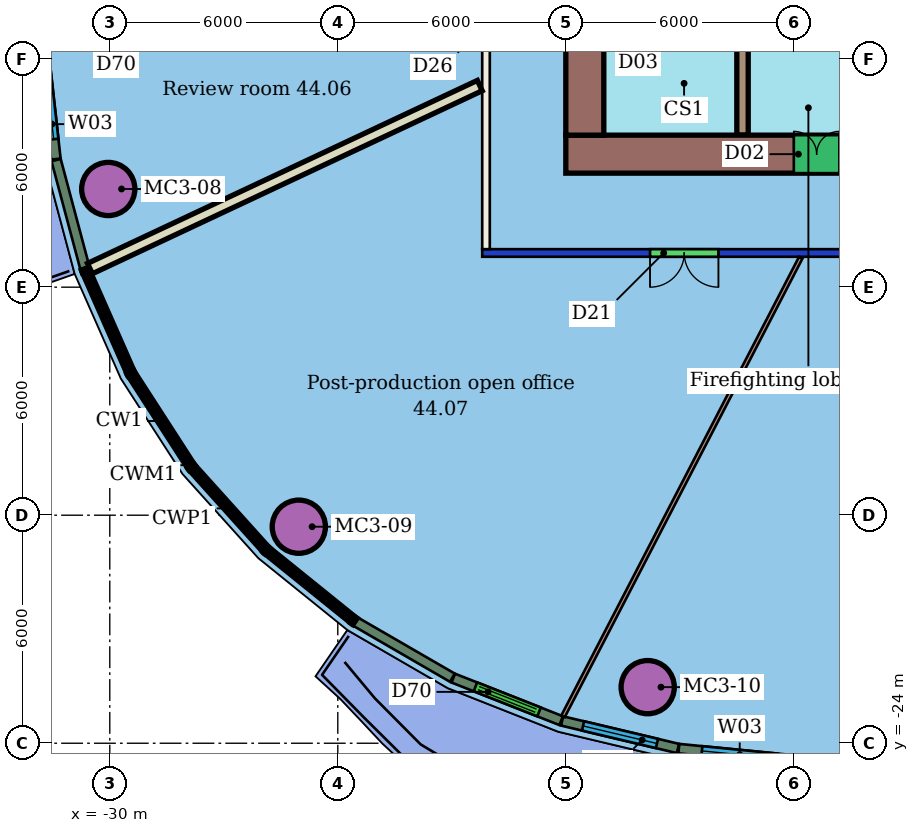
"""IFC4 building model, lengths in metres.
Left out: names, types, materials, properties, quantities, classifications, styles, units other than length and angle.
Written with IfcOpenShell. Run it as: python <this file> out.ifc"""

import sys

from ifc_helpers import new_model, si_unit, direction, frame, frame_2d, origin, origin_2d, place, context, subcontext, project, spatial, rectangle, hollow_circle, extrude, element, fill, save


model = new_model("IFC4")
c1 = context("Model", 3, precision=1e-05, world=origin(), true_north=direction((0.0, 1.0)))
c2 = subcontext(c1, "Body", "Model", "MODEL_VIEW")
j1 = project(units=[si_unit("LENGTHUNIT", "METRE"), si_unit("PLANEANGLEUNIT", "RADIAN")], contexts=[c1])
p1 = place(None, origin())
s1 = spatial("IfcSite", under=j1, at=p1, CompositionType="ELEMENT")
p2 = place(p1, origin())
s2 = spatial("IfcBuilding", under=s1, at=p2, CompositionType="ELEMENT")
p3 = place(p2, frame((0.0, 0.0, 183.0)))
s3 = spatial("IfcBuildingStorey", under=s2, at=p3, CompositionType="ELEMENT", Elevation=183.0)
for number, where, z_axis, x_axis in (
    (1, (-30.041, -9.417, 0.0), (0.0, 0.0, 1.0), (1.0, 0.0, 0.0)),
    (2, (-25.026, -18.303, 0.0), (0.0, 0.0, 1.0), (1.0, 0.0, 0.0)),
    (3, (-15.845, -22.524, 0.0), (0.0, 0.0, 1.0), (1.0, 0.0, 0.0)),
):
    element("IfcColumn", number, at=place(p3, frame(where, z_axis=z_axis, x_axis=x_axis)), inside=s3, PredefinedType="COLUMN", context=c2, shape_type="SweptSolid", body=[
        extrude(hollow_circle(Radius=0.7, WallThickness=0.05, at=origin_2d()), origin(), (0.0, 0.0, 1.0), 3.45),
    ])
p4 = place(p3, frame((8.2, -11.1, 0.0), z_axis=(0.0, 0.0, 1.0), x_axis=(-1.0, 0.0, 0.0)))
e4 = element("IfcWall", 4, at=p4, inside=s3, PredefinedType="PARTITIONING", context=c2, shape_type="SweptSolid", body=[
    extrude(rectangle(XDim=28.4, YDim=0.2, at=frame_2d((14.2, 0.0))), origin(), (0.0, 0.0, 1.0), 3.05),
])
p5 = place(p4, frame((22.184, 0.0, 0.0)))
e5 = element("IfcOpeningElement", 5, at=p5, cuts=e4, PredefinedType="OPENING", context=c2, shape_type="SweptSolid", body=[
    extrude(rectangle(XDim=1.8, YDim=2.1, at=frame_2d((0.9, 1.05))), frame((0.0, 0.11, 0.0), z_axis=(0.0, -1.0, 0.0), x_axis=(1.0, 0.0, 0.0)), (0.0, 0.0, 1.0), 0.22),
])
p6 = place(p4, frame((15.038, 0.0, 0.0)))
e6 = element("IfcOpeningElement", 6, at=p6, cuts=e4, PredefinedType="OPENING", context=c2, shape_type="SweptSolid", body=[
    extrude(rectangle(XDim=1.8, YDim=2.1, at=frame_2d((0.9, 1.05))), frame((0.0, 0.11, 0.0), z_axis=(0.0, -1.0, 0.0), x_axis=(1.0, 0.0, 0.0)), (0.0, 0.0, 1.0), 0.22),
])
p7 = place(p4, frame((4.866, 0.0, 0.0)))
e7 = element("IfcOpeningElement", 7, at=p7, cuts=e4, PredefinedType="OPENING", context=c2, shape_type="SweptSolid", body=[
    extrude(rectangle(XDim=1.0, YDim=2.1, at=frame_2d((0.5, 1.05))), frame((0.0, 0.11, 0.0), z_axis=(0.0, -1.0, 0.0), x_axis=(1.0, 0.0, 0.0)), (0.0, 0.0, 1.0), 0.22),
])
p8 = place(p3, frame((-20.1, -11.0, 0.0), z_axis=(0.0, 0.0, 1.0), x_axis=(0.0, 1.0, 0.0)))
e8 = element("IfcWall", 8, at=p8, inside=s3, PredefinedType="PARTITIONING", context=c2, shape_type="SweptSolid", body=[
    extrude(rectangle(XDim=22.0, YDim=0.2, at=frame_2d((11.0, 0.0))), origin(), (0.0, 0.0, 1.0), 3.45),
])
p9 = place(p8, frame((15.37, 0.0, 0.0)))
e9 = element("IfcOpeningElement", 9, at=p9, cuts=e8, PredefinedType="OPENING", context=c2, shape_type="SweptSolid", body=[
    extrude(rectangle(XDim=1.2, YDim=2.1, at=frame_2d((0.6, 1.05))), frame((0.0, 0.11, 0.0), z_axis=(0.0, -1.0, 0.0), x_axis=(1.0, 0.0, 0.0)), (0.0, 0.0, 1.0), 0.22),
])
p10 = place(p8, frame((9.37, 0.0, 0.0)))
e10 = element("IfcOpeningElement", 10, at=p10, cuts=e8, PredefinedType="OPENING", context=c2, shape_type="SweptSolid", body=[
    extrude(rectangle(XDim=1.2, YDim=2.1, at=frame_2d((0.6, 1.05))), frame((0.0, 0.11, 0.0), z_axis=(0.0, -1.0, 0.0), x_axis=(1.0, 0.0, 0.0)), (0.0, 0.0, 1.0), 0.22),
])
p11 = place(p8, frame((5.797, 0.0, 0.0)))
e11 = element("IfcOpeningElement", 11, at=p11, cuts=e8, PredefinedType="OPENING", context=c2, shape_type="SweptSolid", body=[
    extrude(rectangle(XDim=1.2, YDim=2.1, at=frame_2d((0.6, 1.05))), frame((0.0, 0.11, 0.0), z_axis=(0.0, -1.0, 0.0), x_axis=(1.0, 0.0, 0.0)), (0.0, 0.0, 1.0), 0.22),
])
p12 = place(p3, frame((-30.522, -11.511, 0.0), z_axis=(0.0, 0.0, 1.0), x_axis=(0.905230348608, 0.424921187938, 0.0)))
e12 = element("IfcWall", 12, at=p12, inside=s3, PredefinedType="PARTITIONING", context=c2, shape_type="SweptSolid", body=[
    extrude(rectangle(XDim=11.333, YDim=0.3, at=frame_2d((5.666, 0.0))), origin(), (0.0, 0.0, 1.0), 3.45),
])
p13 = place(p3, frame((-18.073, -23.292, 0.0), z_axis=(0.0, 0.0, 1.0), x_axis=(0.460190817997, 0.88782003302, 0.0)))
e13 = element("IfcWall", 13, at=p13, inside=s3, PredefinedType="PARTITIONING", context=c2, shape_type="SweptSolid", body=[
    extrude(rectangle(XDim=13.594, YDim=0.1, at=frame_2d((6.797, 0.0))), origin(), (0.0, 0.0, 1.0), 3.45),
])
p14 = place(p3, frame((-31.758, -5.597, 0.0), z_axis=(0.0, 0.0, 1.0), x_axis=(0.111450096945, -0.993770031693, 0.0)))
e14 = element("IfcWall", 14, at=p14, inside=s3, PredefinedType="SOLIDWALL", context=c2, shape_type="SweptSolid", body=[
    extrude(rectangle(XDim=3.052, YDim=0.25, at=frame_2d((1.526, 0.0))), origin(), (0.0, 0.0, 1.0), 3.1),
])
p15 = place(p14, frame((0.526, 0.0, 0.9)))
e15 = element("IfcOpeningElement", 15, at=p15, cuts=e14, PredefinedType="OPENING", context=c2, shape_type="SweptSolid", body=[
    extrude(rectangle(XDim=2.0, YDim=2.1, at=frame_2d((1.0, 1.05))), frame((0.0, 0.135, 0.0), z_axis=(0.0, -1.0, 0.0), x_axis=(1.0, 0.0, 0.0)), (0.0, 0.0, 1.0), 0.27),
])
p16 = place(p3, frame((-31.413, -8.656, 0.0), z_axis=(0.0, 0.0, 1.0), x_axis=(0.257791752942, -0.966200503061, 0.0)))
e16 = element("IfcWall", 16, at=p16, inside=s3, PredefinedType="SOLIDWALL", context=c2, shape_type="SweptSolid", body=[
    extrude(rectangle(XDim=2.942, YDim=0.25, at=frame_2d((1.471, 0.0))), origin(), (0.0, 0.0, 1.0), 3.1),
])
p17 = place(p3, frame((-23.532, -20.801, 0.0), z_axis=(0.0, 0.0, 1.0), x_axis=(0.865519049877, -0.500876006912, 0.0)))
e17 = element("IfcWall", 17, at=p17, inside=s3, PredefinedType="SOLIDWALL", context=c2, shape_type="SweptSolid", body=[
    extrude(rectangle(XDim=2.943, YDim=0.25, at=frame_2d((1.471, 0.0))), origin(), (0.0, 0.0, 1.0), 3.1),
])
p18 = place(p3, frame((-20.961, -22.287, 0.0), z_axis=(0.0, 0.0, 1.0), x_axis=(0.930291773294, -0.366820414564, 0.0)))
e18 = element("IfcWall", 18, at=p18, inside=s3, PredefinedType="SOLIDWALL", context=c2, shape_type="SweptSolid", body=[
    extrude(rectangle(XDim=3.052, YDim=0.25, at=frame_2d((1.526, 0.0))), origin(), (0.0, 0.0, 1.0), 3.1),
])
p19 = place(p18, frame((0.626, 0.0, 0.0)))
e19 = element("IfcOpeningElement", 19, at=p19, cuts=e18, PredefinedType="OPENING", context=c2, shape_type="SweptSolid", body=[
    extrude(rectangle(XDim=1.8, YDim=2.4, at=frame_2d((0.9, 1.2))), frame((0.0, 0.135, 0.0), z_axis=(0.0, -1.0, 0.0), x_axis=(1.0, 0.0, 0.0)), (0.0, 0.0, 1.0), 0.27),
])
p20 = place(p3, frame((-18.098, -23.414, 0.0), z_axis=(0.0, 0.0, 1.0), x_axis=(0.972913986276, -0.231167418353, 0.0)))
e20 = element("IfcWall", 20, at=p20, inside=s3, PredefinedType="SOLIDWALL", context=c2, shape_type="SweptSolid", body=[
    extrude(rectangle(XDim=3.133, YDim=0.25, at=frame_2d((1.566, 0.0))), origin(), (0.0, 0.0, 1.0), 3.1),
])
p21 = place(p20, frame((0.566, 0.0, 0.9)))
e21 = element("IfcOpeningElement", 21, at=p21, cuts=e20, PredefinedType="OPENING", context=c2, shape_type="SweptSolid", body=[
    extrude(rectangle(XDim=2.0, YDim=2.1, at=frame_2d((1.0, 1.05))), frame((0.0, 0.135, 0.0), z_axis=(0.0, -1.0, 0.0), x_axis=(1.0, 0.0, 0.0)), (0.0, 0.0, 1.0), 0.27),
])
p22 = place(p3, frame((-15.026, -24.142, 0.0), z_axis=(0.0, 0.0, 1.0), x_axis=(0.995197289781, -0.097889501037, 0.0)))
e22 = element("IfcWall", 22, at=p22, inside=s3, PredefinedType="SOLIDWALL", context=c2, shape_type="SweptSolid", body=[
    extrude(rectangle(XDim=3.22, YDim=0.25, at=frame_2d((1.61, 0.0))), origin(), (0.0, 0.0, 1.0), 3.1),
])
p23 = place(p22, frame((0.61, 0.0, 0.9)))
e23 = element("IfcOpeningElement", 23, at=p23, cuts=e22, PredefinedType="OPENING", context=c2, shape_type="SweptSolid", body=[
    extrude(rectangle(XDim=2.0, YDim=2.1, at=frame_2d((1.0, 1.05))), frame((0.0, 0.135, 0.0), z_axis=(0.0, -1.0, 0.0), x_axis=(1.0, 0.0, 0.0)), (0.0, 0.0, 1.0), 0.27),
])
p24 = place(p3, frame((-11.797, -24.458, 0.0), z_axis=(0.0, 0.0, 1.0), x_axis=(0.999539823928, 0.030333815819, 0.0)))
e24 = element("IfcWall", 24, at=p24, inside=s3, PredefinedType="SOLIDWALL", context=c2, shape_type="SweptSolid", body=[
    extrude(rectangle(XDim=3.308, YDim=0.25, at=frame_2d((1.654, 0.0))), origin(), (0.0, 0.0, 1.0), 3.1),
])
p25 = place(p24, frame((0.654, 0.0, 0.9)))
e25 = element("IfcOpeningElement", 25, at=p25, cuts=e24, PredefinedType="OPENING", context=c2, shape_type="SweptSolid", body=[
    extrude(rectangle(XDim=2.0, YDim=2.1, at=frame_2d((1.0, 1.05))), frame((0.0, 0.135, 0.0), z_axis=(0.0, -1.0, 0.0), x_axis=(1.0, 0.0, 0.0)), (0.0, 0.0, 1.0), 0.27),
])
p26 = place(p3, frame((-18.0, -8.5, 0.0), z_axis=(0.0, 0.0, 1.0), x_axis=(1.0, 0.0, 0.0)))
e26 = element("IfcWall", 26, at=p26, inside=s3, PredefinedType="SHEAR", context=c2, shape_type="SweptSolid", body=[
    extrude(rectangle(XDim=24.0, YDim=1.0, at=frame_2d((12.0, 0.0))), origin(), (0.0, 0.0, 1.0), 3.3),
])
p27 = place(p26, frame((6.0, 0.0, 0.0)))
e27 = element("IfcOpeningElement", 27, at=p27, cuts=e26, PredefinedType="OPENING", context=c2, shape_type="SweptSolid", body=[
    extrude(rectangle(XDim=1.2, YDim=2.1, at=frame_2d((0.6, 1.05))), frame((0.0, 0.51, 0.0), z_axis=(0.0, -1.0, 0.0), x_axis=(1.0, 0.0, 0.0)), (0.0, 0.0, 1.0), 1.02),
])
p28 = place(p3, frame((-17.5, 8.0, 0.0), z_axis=(0.0, 0.0, 1.0), x_axis=(0.0, -1.0, 0.0)))
e28 = element("IfcWall", 28, at=p28, inside=s3, PredefinedType="SHEAR", context=c2, shape_type="SweptSolid", body=[
    extrude(rectangle(XDim=16.0, YDim=1.0, at=frame_2d((8.0, 0.0))), origin(), (0.0, 0.0, 1.0), 3.3),
])
p29 = place(p28, frame((11.9, 0.0, 0.0)))
e29 = element("IfcOpeningElement", 29, at=p29, cuts=e28, PredefinedType="OPENING", context=c2, shape_type="SweptSolid", body=[
    extrude(rectangle(XDim=1.2, YDim=2.1, at=frame_2d((0.6, 1.05))), frame((0.0, 0.51, 0.0), z_axis=(0.0, -1.0, 0.0), x_axis=(1.0, 0.0, 0.0)), (0.0, 0.0, 1.0), 1.02),
])
p30 = place(p28, frame((2.9, 0.0, 0.0)))
e30 = element("IfcOpeningElement", 30, at=p30, cuts=e28, PredefinedType="OPENING", context=c2, shape_type="SweptSolid", body=[
    extrude(rectangle(XDim=1.2, YDim=2.1, at=frame_2d((0.6, 1.05))), frame((0.0, 0.51, 0.0), z_axis=(0.0, -1.0, 0.0), x_axis=(1.0, 0.0, 0.0)), (0.0, 0.0, 1.0), 1.02),
])
p31 = place(p3, frame((-13.35, 8.0, 0.0), z_axis=(0.0, 0.0, 1.0), x_axis=(0.0, -1.0, 0.0)))
e31 = element("IfcWall", 31, at=p31, inside=s3, PredefinedType="SHEAR", context=c2, shape_type="SweptSolid", body=[
    extrude(rectangle(XDim=16.0, YDim=0.3, at=frame_2d((8.0, 0.0))), origin(), (0.0, 0.0, 1.0), 3.3),
])
p32 = place(p31, frame((7.25, 0.0, 0.0)))
e32 = element("IfcOpeningElement", 32, at=p32, cuts=e31, PredefinedType="OPENING", context=c2, shape_type="SweptSolid", body=[
    extrude(rectangle(XDim=1.5, YDim=2.1, at=frame_2d((0.75, 1.05))), frame((0.0, 0.16, 0.0), z_axis=(0.0, -1.0, 0.0), x_axis=(1.0, 0.0, 0.0)), (0.0, 0.0, 1.0), 0.32),
])
p33 = place(p5, origin())
e33 = element("IfcDoor", 33, at=p33, inside=s3, OperationType="DOUBLE_DOOR_SINGLE_SWING", PredefinedType="DOOR", context=c2, shape_type="SweptSolid", body=[
    extrude(rectangle(XDim=1.8, YDim=2.1, at=frame_2d((0.9, 1.05))), frame((0.0, 0.025, 0.0), z_axis=(0.0, -1.0, 0.0), x_axis=(1.0, 0.0, 0.0)), (0.0, 0.0, 1.0), 0.05),
])
fill(e5, e33)
p34 = place(p15, origin())
e34 = element("IfcWindow", 34, at=p34, inside=s3, PartitioningType="SINGLE_PANEL", PredefinedType="WINDOW", context=c2, shape_type="SweptSolid", body=[
    extrude(rectangle(XDim=2.0, YDim=2.1, at=frame_2d((1.0, 1.05))), frame((0.0, 0.03, 0.0), z_axis=(0.0, -1.0, 0.0), x_axis=(1.0, 0.0, 0.0)), (0.0, 0.0, 1.0), 0.06),
])
fill(e15, e34)
p35 = place(p19, origin())
e35 = element("IfcDoor", 35, at=p35, inside=s3, OperationType="DOUBLE_DOOR_SLIDING", PredefinedType="DOOR", context=c2, shape_type="SweptSolid", body=[
    extrude(rectangle(XDim=1.8, YDim=2.4, at=frame_2d((0.9, 1.2))), frame((0.0, 0.025, 0.0), z_axis=(0.0, -1.0, 0.0), x_axis=(1.0, 0.0, 0.0)), (0.0, 0.0, 1.0), 0.05),
])
fill(e19, e35)
p36 = place(p21, origin())
e36 = element("IfcWindow", 36, at=p36, inside=s3, PartitioningType="SINGLE_PANEL", PredefinedType="WINDOW", context=c2, shape_type="SweptSolid", body=[
    extrude(rectangle(XDim=2.0, YDim=2.1, at=frame_2d((1.0, 1.05))), frame((0.0, 0.03, 0.0), z_axis=(0.0, -1.0, 0.0), x_axis=(1.0, 0.0, 0.0)), (0.0, 0.0, 1.0), 0.06),
])
fill(e21, e36)
p37 = place(p23, origin())
e37 = element("IfcWindow", 37, at=p37, inside=s3, PartitioningType="SINGLE_PANEL", PredefinedType="WINDOW", context=c2, shape_type="SweptSolid", body=[
    extrude(rectangle(XDim=2.0, YDim=2.1, at=frame_2d((1.0, 1.05))), frame((0.0, 0.03, 0.0), z_axis=(0.0, -1.0, 0.0), x_axis=(1.0, 0.0, 0.0)), (0.0, 0.0, 1.0), 0.06),
])
fill(e23, e37)
p38 = place(p27, origin())
e38 = element("IfcDoor", 38, at=p38, inside=s3, OperationType="DOUBLE_DOOR_SINGLE_SWING", PredefinedType="NOTDEFINED", context=c2, shape_type="SweptSolid", body=[
    extrude(rectangle(XDim=1.2, YDim=2.1, at=frame_2d((0.6, 1.05))), frame((0.0, 0.025, 0.0), z_axis=(0.0, -1.0, 0.0), x_axis=(1.0, 0.0, 0.0)), (0.0, 0.0, 1.0), 0.05),
])
fill(e27, e38)
save(model, sys.argv[1])
